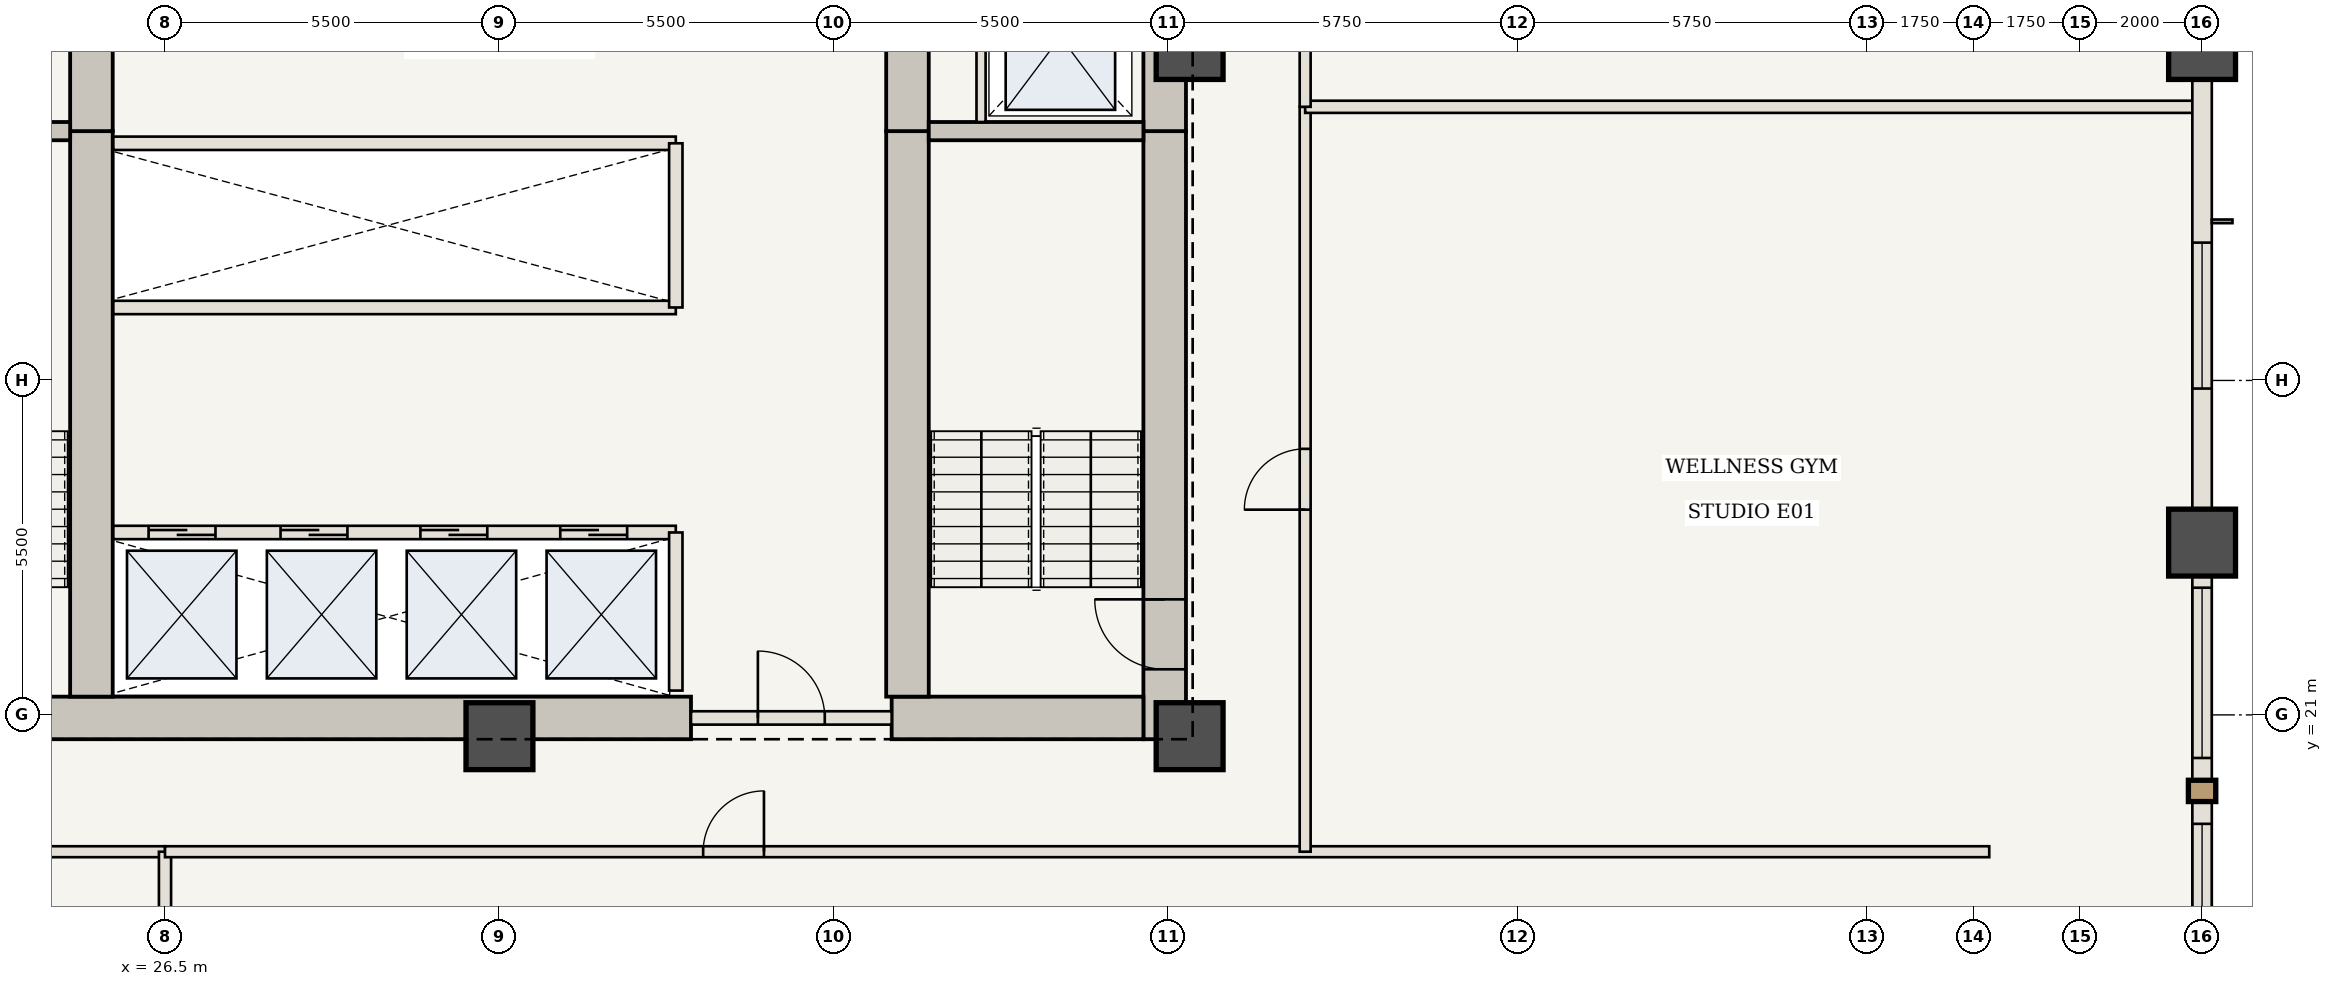
"""IFC4 building model, lengths in metres.
Left out: names, types, materials, properties, quantities, classifications, styles, units other than length and angle.
Written with IfcOpenShell. Run it as: python <this file> out.ifc"""

import sys

from ifc_helpers import new_model, si_unit, direction, frame, frame_2d, origin, origin_2d, place, context, subcontext, project, spatial, rectangle, extrude, element, fill, save


model = new_model("IFC4")
c1 = context("Model", 3, precision=1e-05, world=origin(), true_north=direction((0.0, 1.0)))
c2 = subcontext(c1, "Body", "Model", "MODEL_VIEW")
j1 = project(units=[si_unit("LENGTHUNIT", "METRE"), si_unit("PLANEANGLEUNIT", "RADIAN")], contexts=[c1])
p1 = place(None, origin())
s1 = spatial("IfcSite", under=j1, at=p1, CompositionType="ELEMENT")
p2 = place(p1, origin())
s2 = spatial("IfcBuilding", under=s1, at=p2, CompositionType="ELEMENT")
p3 = place(p2, frame((0.0, 0.0, 85.75)))
s3 = spatial("IfcBuildingStorey", under=s2, at=p3, CompositionType="ELEMENT", Elevation=85.75)
p4 = place(p3, frame((42.94, 20.6, 0.0), z_axis=(0.0, 0.0, 1.0), x_axis=(0.0, 1.0, 0.0)))
e1 = element("IfcWall", 1, at=p4, inside=s3, PredefinedType="SHEAR", context=c2, shape_type="SweptSolid", body=[
    extrude(rectangle(XDim=10.0, YDim=0.7, at=frame_2d((5.0, 0.0))), origin(), (0.0, 0.0, 1.0), 3.5),
])
p5 = place(p4, frame((1.15, 0.0, 0.0)))
e2 = element("IfcOpeningElement", 2, at=p5, cuts=e1, PredefinedType="OPENING", context=c2, shape_type="SweptSolid", body=[
    extrude(rectangle(XDim=1.15, YDim=2.15, at=frame_2d((0.575, 1.075))), frame((0.0, 0.36, 0.0), z_axis=(0.0, -1.0, 0.0), x_axis=(1.0, 0.0, 0.0)), (0.0, 0.0, 1.0), 0.72),
])
p6 = place(p3, frame((42.94, 30.6, 0.0), z_axis=(0.0, 0.0, 1.0), x_axis=(0.0, 1.0, 0.0)))
e3 = element("IfcWall", 3, at=p6, inside=s3, PredefinedType="SHEAR", context=c2, shape_type="SweptSolid", body=[
    extrude(rectangle(XDim=12.75, YDim=0.7, at=frame_2d((6.375, 0.0))), origin(), (0.0, 0.0, 1.0), 3.5),
])
p7 = place(p6, frame((4.2, 0.0, 0.0)))
e4 = element("IfcOpeningElement", 4, at=p7, cuts=e3, PredefinedType="OPENING", context=c2, shape_type="SweptSolid", body=[
    extrude(rectangle(XDim=1.1, YDim=2.15, at=frame_2d((0.55, 1.075))), frame((0.0, 0.36, 0.0), z_axis=(0.0, -1.0, 0.0), x_axis=(1.0, 0.0, 0.0)), (0.0, 0.0, 1.0), 0.72),
])
p8 = place(p6, frame((8.4, 0.0, 0.0)))
e5 = element("IfcOpeningElement", 5, at=p8, cuts=e3, PredefinedType="OPENING", context=c2, shape_type="SweptSolid", body=[
    extrude(rectangle(XDim=0.88, YDim=2.1, at=frame_2d((0.44, 1.05))), frame((0.0, 0.36, 0.0), z_axis=(0.0, -1.0, 0.0), x_axis=(1.0, 0.0, 0.0)), (0.0, 0.0, 1.0), 0.72),
])
p9 = place(p6, frame((10.5, 0.0, 0.0)))
e6 = element("IfcOpeningElement", 6, at=p9, cuts=e3, PredefinedType="OPENING", context=c2, shape_type="SweptSolid", body=[
    extrude(rectangle(XDim=0.88, YDim=2.1, at=frame_2d((0.44, 1.05))), frame((0.0, 0.36, 0.0), z_axis=(0.0, -1.0, 0.0), x_axis=(1.0, 0.0, 0.0)), (0.0, 0.0, 1.0), 0.72),
])
p10 = place(p3, frame((21.41, 20.95, 0.0), z_axis=(0.0, 0.0, 1.0), x_axis=(1.0, 0.0, 0.0)))
e7 = element("IfcWall", 7, at=p10, inside=s3, PredefinedType="SHEAR", context=c2, shape_type="SweptSolid", body=[
    extrude(rectangle(XDim=13.74, YDim=0.7, at=frame_2d((6.87, 0.0))), origin(), (0.0, 0.0, 1.0), 3.5),
])
p11 = place(p3, frame((38.45, 20.95, 0.0), z_axis=(0.0, 0.0, 1.0), x_axis=(1.0, 0.0, 0.0)))
e8 = element("IfcWall", 8, at=p11, inside=s3, PredefinedType="SHEAR", context=c2, shape_type="SweptSolid", body=[
    extrude(rectangle(XDim=4.14, YDim=0.7, at=frame_2d((2.07, 0.0))), origin(), (0.0, 0.0, 1.0), 3.5),
])
p12 = place(p3, frame((25.29, 21.3, 0.0), z_axis=(0.0, 0.0, 1.0), x_axis=(0.0, 1.0, 0.0)))
e9 = element("IfcWall", 9, at=p12, inside=s3, PredefinedType="SHEAR", context=c2, shape_type="SweptSolid", body=[
    extrude(rectangle(XDim=9.3, YDim=0.7, at=frame_2d((4.65, 0.0))), origin(), (0.0, 0.0, 1.0), 3.5),
])
p13 = place(p3, frame((25.29, 30.6, 0.0), z_axis=(0.0, 0.0, 1.0), x_axis=(0.0, 1.0, 0.0)))
e10 = element("IfcWall", 10, at=p13, inside=s3, PredefinedType="SHEAR", context=c2, shape_type="SweptSolid", body=[
    extrude(rectangle(XDim=12.05, YDim=0.7, at=frame_2d((6.025, 0.0))), origin(), (0.0, 0.0, 1.0), 3.5),
])
p14 = place(p13, frame((6.25, 0.0, 0.0)))
e11 = element("IfcOpeningElement", 11, at=p14, cuts=e10, PredefinedType="OPENING", context=c2, shape_type="SweptSolid", body=[
    extrude(rectangle(XDim=1.1, YDim=2.15, at=frame_2d((0.55, 1.075))), frame((0.0, 0.36, 0.0), z_axis=(0.0, -1.0, 0.0), x_axis=(1.0, 0.0, 0.0)), (0.0, 0.0, 1.0), 0.72),
])
p15 = place(p3, frame((38.71, 21.3, 0.0), z_axis=(0.0, 0.0, 1.0), x_axis=(0.0, 1.0, 0.0)))
e12 = element("IfcWall", 12, at=p15, inside=s3, PredefinedType="SHEAR", context=c2, shape_type="SweptSolid", body=[
    extrude(rectangle(XDim=9.3, YDim=0.7, at=frame_2d((4.65, 0.0))), origin(), (0.0, 0.0, 1.0), 3.5),
])
p16 = place(p3, frame((38.71, 30.6, 0.0), z_axis=(0.0, 0.0, 1.0), x_axis=(0.0, 1.0, 0.0)))
e13 = element("IfcWall", 13, at=p16, inside=s3, PredefinedType="SHEAR", context=c2, shape_type="SweptSolid", body=[
    extrude(rectangle(XDim=12.05, YDim=0.7, at=frame_2d((6.025, 0.0))), origin(), (0.0, 0.0, 1.0), 3.5),
])
for number, where, z_axis, x_axis in (
    (14, (32.0, 20.65, 0.0), (0.0, 0.0, 1.0), (1.0, 0.0, 0.0)),
    (15, (43.35, 20.65, 0.0), (0.0, 0.0, 1.0), (1.0, 0.0, 0.0)),
    (16, (43.35, 32.0, 0.0), (0.0, 0.0, 1.0), (1.0, 0.0, 0.0)),
    (17, (60.0, 23.833, 0.0), (0.0, 0.0, 1.0), (1.0, 0.0, 0.0)),
    (18, (60.0, 32.0, 0.0), (0.0, 0.0, 1.0), (1.0, 0.0, 0.0)),
):
    element("IfcColumn", number, at=place(p3, frame(where, z_axis=z_axis, x_axis=x_axis)), inside=s3, PredefinedType="COLUMN", context=c2, shape_type="SweptSolid", body=[
        extrude(rectangle(XDim=1.1, YDim=1.1, at=origin_2d()), origin(), (0.0, 0.0, 1.0), 3.5),
    ])
for number, where, z_axis, x_axis in (
    (19, (21.41, 30.6, 0.0), (0.0, 0.0, 1.0), (1.0, 0.0, 0.0)),
    (20, (39.06, 30.6, 0.0), (0.0, 0.0, 1.0), (1.0, 0.0, 0.0)),
):
    element("IfcWall", number, at=place(p3, frame(where, z_axis=z_axis, x_axis=x_axis)), inside=s3, PredefinedType="SHEAR", context=c2, shape_type="SweptSolid", body=[
        extrude(rectangle(XDim=3.53, YDim=0.3, at=frame_2d((1.765, 0.0))), origin(), (0.0, 0.0, 1.0), 3.32),
    ])
p17 = place(p3, frame((39.92, 30.75, 0.0), z_axis=(0.0, 0.0, 1.0), x_axis=(0.0, 1.0, 0.0)))
e21 = element("IfcWall", 21, at=p17, inside=s3, PredefinedType="STANDARD", context=c2, shape_type="SweptSolid", body=[
    extrude(rectangle(XDim=2.65, YDim=0.15, at=frame_2d((1.325, 0.0))), origin(), (0.0, 0.0, 1.0), 3.32),
])
p18 = place(p3, frame((35.15, 20.95, 0.0), z_axis=(0.0, 0.0, 1.0), x_axis=(1.0, 0.0, 0.0)))
e22 = element("IfcWall", 22, at=p18, inside=s3, PredefinedType="STANDARD", context=c2, shape_type="SweptSolid", body=[
    extrude(rectangle(XDim=3.3, YDim=0.22, at=frame_2d((1.65, 0.0))), origin(), (0.0, 0.0, 1.0), 3.32),
])
p19 = place(p18, frame((1.1, 0.0, 0.0)))
e23 = element("IfcOpeningElement", 23, at=p19, cuts=e22, PredefinedType="OPENING", context=c2, shape_type="SweptSolid", body=[
    extrude(rectangle(XDim=1.1, YDim=2.15, at=frame_2d((0.55, 1.075))), frame((0.0, 0.12, 0.0), z_axis=(0.0, -1.0, 0.0), x_axis=(1.0, 0.0, 0.0)), (0.0, 0.0, 1.0), 0.24),
])
p20 = place(p3, frame((25.65, 24.0, 0.0), z_axis=(0.0, 0.0, 1.0), x_axis=(1.0, 0.0, 0.0)))
e24 = element("IfcWall", 24, at=p20, inside=s3, PredefinedType="STANDARD", context=c2, shape_type="SweptSolid", body=[
    extrude(rectangle(XDim=9.25, YDim=0.22, at=frame_2d((4.625, 0.0))), origin(), (0.0, 0.0, 1.0), 3.32),
])
p21 = place(p20, frame((0.58, 0.0, 0.0)))
e25 = element("IfcOpeningElement", 25, at=p21, cuts=e24, PredefinedType="OPENING", context=c2, shape_type="SweptSolid", body=[
    extrude(rectangle(XDim=1.1, YDim=2.15, at=frame_2d((0.55, 1.075))), frame((0.0, 0.12, 0.0), z_axis=(0.0, -1.0, 0.0), x_axis=(1.0, 0.0, 0.0)), (0.0, 0.0, 1.0), 0.24),
])
p22 = place(p20, frame((2.75, 0.0, 0.0)))
e26 = element("IfcOpeningElement", 26, at=p22, cuts=e24, PredefinedType="OPENING", context=c2, shape_type="SweptSolid", body=[
    extrude(rectangle(XDim=1.1, YDim=2.15, at=frame_2d((0.55, 1.075))), frame((0.0, 0.12, 0.0), z_axis=(0.0, -1.0, 0.0), x_axis=(1.0, 0.0, 0.0)), (0.0, 0.0, 1.0), 0.24),
])
p23 = place(p20, frame((5.05, 0.0, 0.0)))
e27 = element("IfcOpeningElement", 27, at=p23, cuts=e24, PredefinedType="OPENING", context=c2, shape_type="SweptSolid", body=[
    extrude(rectangle(XDim=1.1, YDim=2.15, at=frame_2d((0.55, 1.075))), frame((0.0, 0.12, 0.0), z_axis=(0.0, -1.0, 0.0), x_axis=(1.0, 0.0, 0.0)), (0.0, 0.0, 1.0), 0.24),
])
p24 = place(p20, frame((7.35, 0.0, 0.0)))
e28 = element("IfcOpeningElement", 28, at=p24, cuts=e24, PredefinedType="OPENING", context=c2, shape_type="SweptSolid", body=[
    extrude(rectangle(XDim=1.1, YDim=2.15, at=frame_2d((0.55, 1.075))), frame((0.0, 0.12, 0.0), z_axis=(0.0, -1.0, 0.0), x_axis=(1.0, 0.0, 0.0)), (0.0, 0.0, 1.0), 0.24),
])
p25 = place(p3, frame((34.9, 21.4, 0.0), z_axis=(0.0, 0.0, 1.0), x_axis=(0.0, 1.0, 0.0)))
e29 = element("IfcWall", 29, at=p25, inside=s3, PredefinedType="STANDARD", context=c2, shape_type="SweptSolid", body=[
    extrude(rectangle(XDim=2.6, YDim=0.22, at=frame_2d((1.3, 0.0))), origin(), (0.0, 0.0, 1.0), 3.32),
])
for number, where, z_axis, x_axis in (
    (30, (25.65, 27.7, 0.0), (0.0, 0.0, 1.0), (1.0, 0.0, 0.0)),
    (31, (25.65, 30.4, 0.0), (0.0, 0.0, 1.0), (1.0, 0.0, 0.0)),
):
    element("IfcWall", number, at=place(p3, frame(where, z_axis=z_axis, x_axis=x_axis)), inside=s3, PredefinedType="STANDARD", context=c2, shape_type="SweptSolid", body=[
        extrude(rectangle(XDim=9.25, YDim=0.22, at=frame_2d((4.625, 0.0))), origin(), (0.0, 0.0, 1.0), 3.32),
    ])
p26 = place(p3, frame((34.9, 27.7, 0.0), z_axis=(0.0, 0.0, 1.0), x_axis=(0.0, 1.0, 0.0)))
e32 = element("IfcWall", 32, at=p26, inside=s3, PredefinedType="STANDARD", context=c2, shape_type="SweptSolid", body=[
    extrude(rectangle(XDim=2.7, YDim=0.22, at=frame_2d((1.35, 0.0))), origin(), (0.0, 0.0, 1.0), 3.32),
])
p27 = place(p3, frame((7.5, 18.75, 0.0), z_axis=(0.0, 0.0, 1.0), x_axis=(1.0, 0.0, 0.0)))
e33 = element("IfcWall", 33, at=p27, inside=s3, PredefinedType="STANDARD", context=c2, shape_type="SweptSolid", body=[
    extrude(rectangle(XDim=19.0, YDim=0.18, at=frame_2d((9.5, 0.0))), origin(), (0.0, 0.0, 1.0), 3.32),
])
p28 = place(p27, frame((14.65, 0.0, 0.0)))
e34 = element("IfcOpeningElement", 34, at=p28, cuts=e33, PredefinedType="OPENING", context=c2, shape_type="SweptSolid", body=[
    extrude(rectangle(XDim=1.0, YDim=2.15, at=frame_2d((0.5, 1.075))), frame((0.0, 0.1, 0.0), z_axis=(0.0, -1.0, 0.0), x_axis=(1.0, 0.0, 0.0)), (0.0, 0.0, 1.0), 0.2),
])
p29 = place(p3, frame((26.5, 4.06, 0.0), z_axis=(0.0, 0.0, 1.0), x_axis=(0.0, 1.0, 0.0)))
e35 = element("IfcWall", 35, at=p29, inside=s3, PredefinedType="STANDARD", context=c2, shape_type="SweptSolid", body=[
    extrude(rectangle(XDim=14.69, YDim=0.2, at=frame_2d((7.345, 0.0))), origin(), (0.0, 0.0, 1.0), 3.32),
])
p30 = place(p3, frame((26.5, 18.75, 0.0), z_axis=(0.0, 0.0, 1.0), x_axis=(1.0, 0.0, 0.0)))
e36 = element("IfcWall", 36, at=p30, inside=s3, PredefinedType="STANDARD", context=c2, shape_type="SweptSolid", body=[
    extrude(rectangle(XDim=30.0, YDim=0.18, at=frame_2d((15.0, 0.0))), origin(), (0.0, 0.0, 1.0), 3.32),
])
p31 = place(p30, frame((8.85, 0.0, 0.0)))
e37 = element("IfcOpeningElement", 37, at=p31, cuts=e36, PredefinedType="OPENING", context=c2, shape_type="SweptSolid", body=[
    extrude(rectangle(XDim=1.0, YDim=2.15, at=frame_2d((0.5, 1.075))), frame((0.0, 0.1, 0.0), z_axis=(0.0, -1.0, 0.0), x_axis=(1.0, 0.0, 0.0)), (0.0, 0.0, 1.0), 0.2),
])
p32 = place(p3, frame((45.25, 18.75, 0.0), z_axis=(0.0, 0.0, 1.0), x_axis=(0.0, 1.0, 0.0)))
e38 = element("IfcWall", 38, at=p32, inside=s3, PredefinedType="STANDARD", context=c2, shape_type="SweptSolid", body=[
    extrude(rectangle(XDim=12.25, YDim=0.18, at=frame_2d((6.125, 0.0))), origin(), (0.0, 0.0, 1.0), 3.32),
])
p33 = place(p32, frame((5.625, 0.0, 0.0)))
e39 = element("IfcOpeningElement", 39, at=p33, cuts=e38, PredefinedType="OPENING", context=c2, shape_type="SweptSolid", body=[
    extrude(rectangle(XDim=1.0, YDim=2.15, at=frame_2d((0.5, 1.075))), frame((0.0, 0.1, 0.0), z_axis=(0.0, -1.0, 0.0), x_axis=(1.0, 0.0, 0.0)), (0.0, 0.0, 1.0), 0.2),
])
p34 = place(p3, frame((45.25, 31.0, 0.0), z_axis=(0.0, 0.0, 1.0), x_axis=(1.0, 0.0, 0.0)))
e40 = element("IfcWall", 40, at=p34, inside=s3, PredefinedType="STANDARD", context=c2, shape_type="SweptSolid", body=[
    extrude(rectangle(XDim=14.69, YDim=0.2, at=frame_2d((7.345, 0.0))), origin(), (0.0, 0.0, 1.0), 3.32),
])
p35 = place(p3, frame((45.25, 31.0, 0.0), z_axis=(0.0, 0.0, 1.0), x_axis=(0.0, 1.0, 0.0)))
e41 = element("IfcWall", 41, at=p35, inside=s3, PredefinedType="STANDARD", context=c2, shape_type="SweptSolid", body=[
    extrude(rectangle(XDim=14.25, YDim=0.18, at=frame_2d((7.125, 0.0))), origin(), (0.0, 0.0, 1.0), 3.32),
])
p36 = place(p35, frame((6.625, 0.0, 0.0)))
e42 = element("IfcOpeningElement", 42, at=p36, cuts=e41, PredefinedType="OPENING", context=c2, shape_type="SweptSolid", body=[
    extrude(rectangle(XDim=1.0, YDim=2.15, at=frame_2d((0.5, 1.075))), frame((0.0, 0.1, 0.0), z_axis=(0.0, -1.0, 0.0), x_axis=(1.0, 0.0, 0.0)), (0.0, 0.0, 1.0), 0.2),
])
p37 = place(p3, frame((60.0, 23.833, 0.0), z_axis=(0.0, 0.0, 1.0), x_axis=(0.0, -1.0, 0.0)))
e43 = element("IfcWall", 43, at=p37, inside=s3, PredefinedType="USERDEFINED", context=c2, shape_type="SweptSolid", body=[
    extrude(rectangle(XDim=8.167, YDim=0.32, at=frame_2d((4.083, 0.0))), origin(), (0.0, 0.0, 1.0), 2.52),
])
p38 = place(p37, frame((0.742, 0.0, 0.85)))
e44 = element("IfcOpeningElement", 44, at=p38, cuts=e43, PredefinedType="OPENING", context=c2, shape_type="SweptSolid", body=[
    extrude(rectangle(XDim=2.8, YDim=1.47, at=frame_2d((1.4, 0.735))), frame((0.0, 0.17, 0.0), z_axis=(0.0, -1.0, 0.0), x_axis=(1.0, 0.0, 0.0)), (0.0, 0.0, 1.0), 0.34),
])
p39 = place(p37, frame((4.625, 0.0, 0.85)))
e45 = element("IfcOpeningElement", 45, at=p39, cuts=e43, PredefinedType="OPENING", context=c2, shape_type="SweptSolid", body=[
    extrude(rectangle(XDim=2.8, YDim=1.47, at=frame_2d((1.4, 0.735))), frame((0.0, 0.17, 0.0), z_axis=(0.0, -1.0, 0.0), x_axis=(1.0, 0.0, 0.0)), (0.0, 0.0, 1.0), 0.34),
])
p40 = place(p3, frame((60.0, 32.0, 0.0), z_axis=(0.0, 0.0, 1.0), x_axis=(0.0, -1.0, 0.0)))
e46 = element("IfcWall", 46, at=p40, inside=s3, PredefinedType="USERDEFINED", context=c2, shape_type="SweptSolid", body=[
    extrude(rectangle(XDim=8.167, YDim=0.32, at=frame_2d((4.083, 0.0))), origin(), (0.0, 0.0, 1.0), 2.52),
])
p41 = place(p40, frame((3.233, 0.0, 0.85)))
e47 = element("IfcOpeningElement", 47, at=p41, cuts=e46, PredefinedType="OPENING", context=c2, shape_type="SweptSolid", body=[
    extrude(rectangle(XDim=2.4, YDim=1.47, at=frame_2d((1.2, 0.735))), frame((0.0, 0.17, 0.0), z_axis=(0.0, -1.0, 0.0), x_axis=(1.0, 0.0, 0.0)), (0.0, 0.0, 1.0), 0.34),
])
p42 = place(p5, origin())
e48 = element("IfcDoor", 48, at=p42, inside=s3, OperationType="SINGLE_SWING_RIGHT", PredefinedType="DOOR", context=c2, shape_type="SweptSolid", body=[
    extrude(rectangle(XDim=1.15, YDim=2.15, at=frame_2d((0.575, 1.075))), frame((0.0, 0.025, 0.0), z_axis=(0.0, -1.0, 0.0), x_axis=(1.0, 0.0, 0.0)), (0.0, 0.0, 1.0), 0.05),
])
fill(e2, e48)
p43 = place(p19, origin())
e49 = element("IfcDoor", 49, at=p43, inside=s3, OperationType="SINGLE_SWING_LEFT", PredefinedType="DOOR", context=c2, shape_type="SweptSolid", body=[
    extrude(rectangle(XDim=1.1, YDim=2.15, at=frame_2d((0.55, 1.075))), frame((0.0, 0.025, 0.0), z_axis=(0.0, -1.0, 0.0), x_axis=(1.0, 0.0, 0.0)), (0.0, 0.0, 1.0), 0.05),
])
fill(e23, e49)
p44 = place(p21, origin())
e50 = element("IfcDoor", 50, at=p44, inside=s3, OperationType="DOUBLE_DOOR_SLIDING", PredefinedType="DOOR", context=c2, shape_type="SweptSolid", body=[
    extrude(rectangle(XDim=1.1, YDim=2.15, at=frame_2d((0.55, 1.075))), frame((0.0, 0.025, 0.0), z_axis=(0.0, -1.0, 0.0), x_axis=(1.0, 0.0, 0.0)), (0.0, 0.0, 1.0), 0.05),
])
fill(e25, e50)
p45 = place(p22, origin())
e51 = element("IfcDoor", 51, at=p45, inside=s3, OperationType="DOUBLE_DOOR_SLIDING", PredefinedType="DOOR", context=c2, shape_type="SweptSolid", body=[
    extrude(rectangle(XDim=1.1, YDim=2.15, at=frame_2d((0.55, 1.075))), frame((0.0, 0.025, 0.0), z_axis=(0.0, -1.0, 0.0), x_axis=(1.0, 0.0, 0.0)), (0.0, 0.0, 1.0), 0.05),
])
fill(e26, e51)
p46 = place(p23, origin())
e52 = element("IfcDoor", 52, at=p46, inside=s3, OperationType="DOUBLE_DOOR_SLIDING", PredefinedType="DOOR", context=c2, shape_type="SweptSolid", body=[
    extrude(rectangle(XDim=1.1, YDim=2.15, at=frame_2d((0.55, 1.075))), frame((0.0, 0.025, 0.0), z_axis=(0.0, -1.0, 0.0), x_axis=(1.0, 0.0, 0.0)), (0.0, 0.0, 1.0), 0.05),
])
fill(e27, e52)
p47 = place(p24, origin())
e53 = element("IfcDoor", 53, at=p47, inside=s3, OperationType="DOUBLE_DOOR_SLIDING", PredefinedType="DOOR", context=c2, shape_type="SweptSolid", body=[
    extrude(rectangle(XDim=1.1, YDim=2.15, at=frame_2d((0.55, 1.075))), frame((0.0, 0.025, 0.0), z_axis=(0.0, -1.0, 0.0), x_axis=(1.0, 0.0, 0.0)), (0.0, 0.0, 1.0), 0.05),
])
fill(e28, e53)
p48 = place(p31, origin())
e54 = element("IfcDoor", 54, at=p48, inside=s3, OperationType="SINGLE_SWING_RIGHT", PredefinedType="DOOR", context=c2, shape_type="SweptSolid", body=[
    extrude(rectangle(XDim=1.0, YDim=2.15, at=frame_2d((0.5, 1.075))), frame((0.0, 0.025, 0.0), z_axis=(0.0, -1.0, 0.0), x_axis=(1.0, 0.0, 0.0)), (0.0, 0.0, 1.0), 0.05),
])
fill(e37, e54)
p49 = place(p33, origin())
e55 = element("IfcDoor", 55, at=p49, inside=s3, OperationType="SINGLE_SWING_LEFT", PredefinedType="DOOR", context=c2, shape_type="SweptSolid", body=[
    extrude(rectangle(XDim=1.0, YDim=2.15, at=frame_2d((0.5, 1.075))), frame((0.0, 0.025, 0.0), z_axis=(0.0, -1.0, 0.0), x_axis=(1.0, 0.0, 0.0)), (0.0, 0.0, 1.0), 0.05),
])
fill(e39, e55)
p50 = place(p38, origin())
e56 = element("IfcWindow", 56, at=p50, inside=s3, PartitioningType="SINGLE_PANEL", PredefinedType="WINDOW", context=c2, shape_type="SweptSolid", body=[
    extrude(rectangle(XDim=2.8, YDim=1.47, at=frame_2d((1.4, 0.735))), frame((0.0, 0.03, 0.0), z_axis=(0.0, -1.0, 0.0), x_axis=(1.0, 0.0, 0.0)), (0.0, 0.0, 1.0), 0.06),
])
fill(e44, e56)
p51 = place(p39, origin())
e57 = element("IfcWindow", 57, at=p51, inside=s3, PartitioningType="SINGLE_PANEL", PredefinedType="WINDOW", context=c2, shape_type="SweptSolid", body=[
    extrude(rectangle(XDim=2.8, YDim=1.47, at=frame_2d((1.4, 0.735))), frame((0.0, 0.03, 0.0), z_axis=(0.0, -1.0, 0.0), x_axis=(1.0, 0.0, 0.0)), (0.0, 0.0, 1.0), 0.06),
])
fill(e45, e57)
p52 = place(p41, origin())
e58 = element("IfcWindow", 58, at=p52, inside=s3, PartitioningType="SINGLE_PANEL", PredefinedType="WINDOW", context=c2, shape_type="SweptSolid", body=[
    extrude(rectangle(XDim=2.4, YDim=1.47, at=frame_2d((1.2, 0.735))), frame((0.0, 0.03, 0.0), z_axis=(0.0, -1.0, 0.0), x_axis=(1.0, 0.0, 0.0)), (0.0, 0.0, 1.0), 0.06),
])
fill(e47, e58)
save(model, sys.argv[1])
